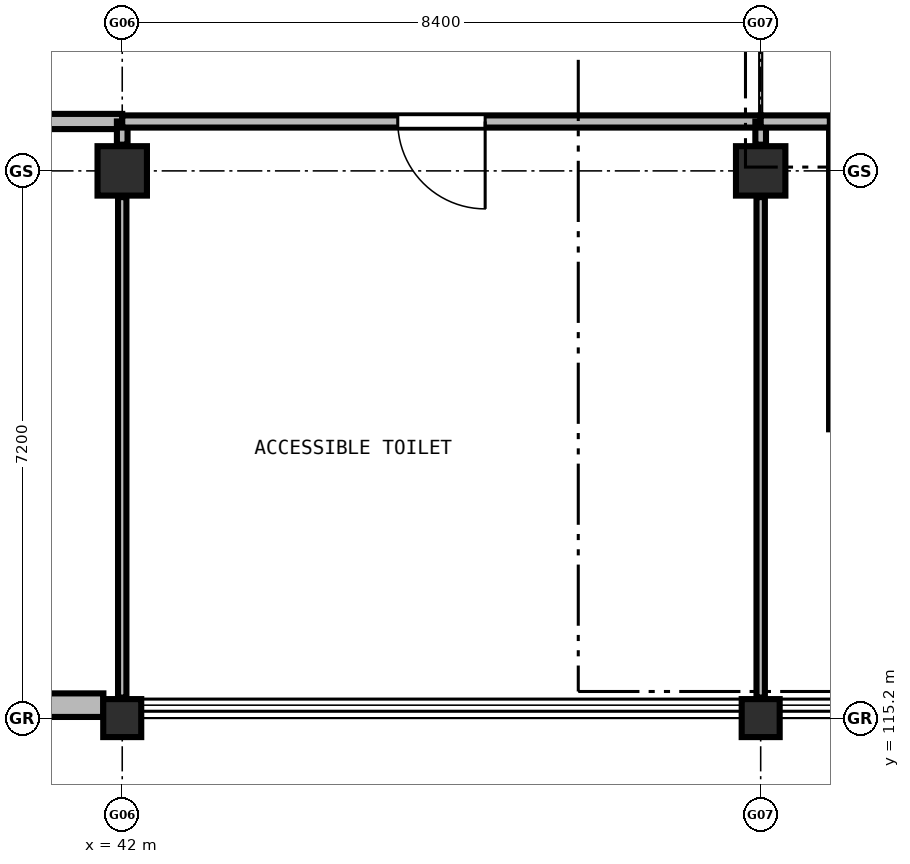
"""IFC4 building model, lengths in metres.
Left out: names, types, materials, properties, quantities, classifications, styles, units other than length and angle.
Written with IfcOpenShell. Run it as: python <this file> out.ifc"""

import sys

from ifc_helpers import new_model, si_unit, direction, frame, frame_2d, origin, origin_2d, place, context, subcontext, project, spatial, rectangle, extrude, element, fill, save


model = new_model("IFC4")
c1 = context("Model", 3, precision=1e-05, world=origin(), true_north=direction((0.0, 1.0)))
c2 = subcontext(c1, "Body", "Model", "MODEL_VIEW")
j1 = project(units=[si_unit("LENGTHUNIT", "METRE"), si_unit("PLANEANGLEUNIT", "RADIAN")], contexts=[c1])
p1 = place(None, origin())
s1 = spatial("IfcSite", under=j1, at=p1, CompositionType="ELEMENT")
p2 = place(p1, origin())
s2 = spatial("IfcBuilding", under=s1, at=p2, CompositionType="ELEMENT")
p3 = place(p2, frame((0.0, 0.0, 13.5)))
s3 = spatial("IfcBuildingStorey", under=s2, at=p3, CompositionType="ELEMENT", Elevation=13.5)
p4 = place(p3, frame((42.0, 115.2, 0.0), z_axis=(0.0, 0.0, 1.0), x_axis=(1.0, 0.0, 0.0)))
e1 = element("IfcColumn", 1, at=p4, inside=s3, PredefinedType="COLUMN", context=c2, shape_type="SweptSolid", body=[
    extrude(rectangle(XDim=0.5, YDim=0.5, at=origin_2d()), origin(), (0.0, 0.0, 1.0), 4.2),
])
p5 = place(p3, frame((42.0, 122.4, 0.0), z_axis=(0.0, 0.0, 1.0), x_axis=(1.0, 0.0, 0.0)))
e2 = element("IfcColumn", 2, at=p5, inside=s3, PredefinedType="COLUMN", context=c2, shape_type="SweptSolid", body=[
    extrude(rectangle(XDim=0.65, YDim=0.65, at=origin_2d()), origin(), (0.0, 0.0, 1.0), 4.2),
])
p6 = place(p3, frame((50.4, 115.2, 0.0), z_axis=(0.0, 0.0, 1.0), x_axis=(1.0, 0.0, 0.0)))
e3 = element("IfcColumn", 3, at=p6, inside=s3, PredefinedType="COLUMN", context=c2, shape_type="SweptSolid", body=[
    extrude(rectangle(XDim=0.5, YDim=0.5, at=origin_2d()), origin(), (0.0, 0.0, 1.0), 4.2),
])
p7 = place(p3, frame((50.4, 122.4, 0.0), z_axis=(0.0, 0.0, 1.0), x_axis=(1.0, 0.0, 0.0)))
e4 = element("IfcColumn", 4, at=p7, inside=s3, PredefinedType="COLUMN", context=c2, shape_type="SweptSolid", body=[
    extrude(rectangle(XDim=0.65, YDim=0.65, at=origin_2d()), origin(), (0.0, 0.0, 1.0), 4.2),
])
p8 = place(p3, frame((41.752, 115.37, 0.0), z_axis=(0.0, 0.0, 1.0), x_axis=(-1.0, 0.0, 0.0)))
e5 = element("IfcWall", 5, at=p8, inside=s3, PredefinedType="SOLIDWALL", context=c2, shape_type="SweptSolid", body=[
    extrude(rectangle(XDim=7.904, YDim=0.31, at=frame_2d((3.952, 0.0))), origin(), (0.0, 0.0, 1.0), 3.16),
])
p9 = place(p8, frame((1.235, 0.0, 0.95)))
e6 = element("IfcOpeningElement", 6, at=p9, cuts=e5, PredefinedType="OPENING", context=c2, shape_type="SweptSolid", body=[
    extrude(rectangle(XDim=2.1, YDim=1.85, at=frame_2d((1.05, 0.925))), frame((0.0, 0.165, 0.0), z_axis=(0.0, -1.0, 0.0), x_axis=(1.0, 0.0, 0.0)), (0.0, 0.0, 1.0), 0.33),
])
p10 = place(p8, frame((4.569, 0.0, 0.95)))
e7 = element("IfcOpeningElement", 7, at=p10, cuts=e5, PredefinedType="OPENING", context=c2, shape_type="SweptSolid", body=[
    extrude(rectangle(XDim=2.1, YDim=1.85, at=frame_2d((1.05, 0.925))), frame((0.0, 0.165, 0.0), z_axis=(0.0, -1.0, 0.0), x_axis=(1.0, 0.0, 0.0)), (0.0, 0.0, 1.0), 0.33),
])
p11 = place(p3, frame((51.45, 119.0, 0.0), z_axis=(0.0, 0.0, 1.0), x_axis=(0.0, 1.0, 0.0)))
e8 = element("IfcWall", 8, at=p11, inside=s3, PredefinedType="SHEAR", context=c2, shape_type="SweptSolid", body=[
    extrude(rectangle(XDim=4.1, YDim=0.3, at=frame_2d((2.05, 0.0))), origin(), (0.0, 0.0, 1.0), 3.88),
])
p12 = place(p3, frame((42.0, 123.05, 0.0), z_axis=(0.0, 0.0, 1.0), x_axis=(-1.0, 0.0, 0.0)))
e9 = element("IfcWall", 9, at=p12, inside=s3, PredefinedType="SOLIDWALL", context=c2, shape_type="SweptSolid", body=[
    extrude(rectangle(XDim=8.4, YDim=0.2, at=frame_2d((4.2, 0.0))), origin(), (0.0, 0.0, 1.0), 3.355),
])
p13 = place(p12, frame((3.6, 0.0, 0.0)))
e10 = element("IfcOpeningElement", 10, at=p13, cuts=e9, PredefinedType="OPENING", context=c2, shape_type="SweptSolid", body=[
    extrude(rectangle(XDim=1.2, YDim=2.15, at=frame_2d((0.6, 1.075))), frame((0.0, 0.11, 0.0), z_axis=(0.0, -1.0, 0.0), x_axis=(1.0, 0.0, 0.0)), (0.0, 0.0, 1.0), 0.22),
])
p14 = place(p3, frame((42.0, 115.47, 0.0), z_axis=(0.0, 0.0, 1.0), x_axis=(0.0, 1.0, 0.0)))
e11 = element("IfcWall", 11, at=p14, inside=s3, PredefinedType="PARTITIONING", context=c2, shape_type="SweptSolid", body=[
    extrude(rectangle(XDim=6.585, YDim=0.11, at=frame_2d((3.292, 0.0))), origin(), (0.0, 0.0, 1.0), 3.155),
])
p15 = place(p3, frame((42.0, 122.745, 0.0), z_axis=(0.0, 0.0, 1.0), x_axis=(0.0, 1.0, 0.0)))
e12 = element("IfcWall", 12, at=p15, inside=s3, PredefinedType="PARTITIONING", context=c2, shape_type="SweptSolid", body=[
    extrude(rectangle(XDim=0.305, YDim=0.14, at=frame_2d((0.152, 0.0))), origin(), (0.0, 0.0, 1.0), 3.225),
])
p16 = place(p3, frame((50.4, 123.05, 0.0), z_axis=(0.0, 0.0, 1.0), x_axis=(-1.0, 0.0, 0.0)))
e13 = element("IfcWall", 13, at=p16, inside=s3, PredefinedType="PARTITIONING", context=c2, shape_type="SweptSolid", body=[
    extrude(rectangle(XDim=8.4, YDim=0.16, at=frame_2d((4.2, 0.0))), origin(), (0.0, 0.0, 1.0), 3.355),
])
p17 = place(p16, frame((3.625, 0.0, 0.0)))
e14 = element("IfcOpeningElement", 14, at=p17, cuts=e13, PredefinedType="OPENING", context=c2, shape_type="SweptSolid", body=[
    extrude(rectangle(XDim=1.15, YDim=2.15, at=frame_2d((0.575, 1.075))), frame((0.0, 0.09, 0.0), z_axis=(0.0, -1.0, 0.0), x_axis=(1.0, 0.0, 0.0)), (0.0, 0.0, 1.0), 0.18),
])
p18 = place(p3, frame((50.4, 115.47, 0.0), z_axis=(0.0, 0.0, 1.0), x_axis=(0.0, 1.0, 0.0)))
e15 = element("IfcWall", 15, at=p18, inside=s3, PredefinedType="PARTITIONING", context=c2, shape_type="SweptSolid", body=[
    extrude(rectangle(XDim=6.585, YDim=0.11, at=frame_2d((3.292, 0.0))), origin(), (0.0, 0.0, 1.0), 3.155),
])
p19 = place(p3, frame((50.4, 122.745, 0.0), z_axis=(0.0, 0.0, 1.0), x_axis=(0.0, 1.0, 0.0)))
e16 = element("IfcWall", 16, at=p19, inside=s3, PredefinedType="PARTITIONING", context=c2, shape_type="SweptSolid", body=[
    extrude(rectangle(XDim=0.305, YDim=0.14, at=frame_2d((0.152, 0.0))), origin(), (0.0, 0.0, 1.0), 3.225),
])
p20 = place(p3, frame((51.31, 123.05, 0.0), z_axis=(0.0, 0.0, 1.0), x_axis=(-1.0, 0.0, 0.0)))
e17 = element("IfcWall", 17, at=p20, inside=s3, PredefinedType="PARTITIONING", context=c2, shape_type="SweptSolid", body=[
    extrude(rectangle(XDim=0.91, YDim=0.16, at=frame_2d((0.455, 0.0))), origin(), (0.0, 0.0, 1.0), 3.355),
])
p21 = place(p17, origin())
e18 = element("IfcDoor", 18, at=p21, inside=s3, OperationType="SINGLE_SWING_LEFT", PredefinedType="DOOR", context=c2, shape_type="SweptSolid", body=[
    extrude(rectangle(XDim=1.15, YDim=2.15, at=frame_2d((0.575, 1.075))), frame((0.0, 0.025, 0.0), z_axis=(0.0, -1.0, 0.0), x_axis=(1.0, 0.0, 0.0)), (0.0, 0.0, 1.0), 0.05),
])
fill(e14, e18)
save(model, sys.argv[1])
